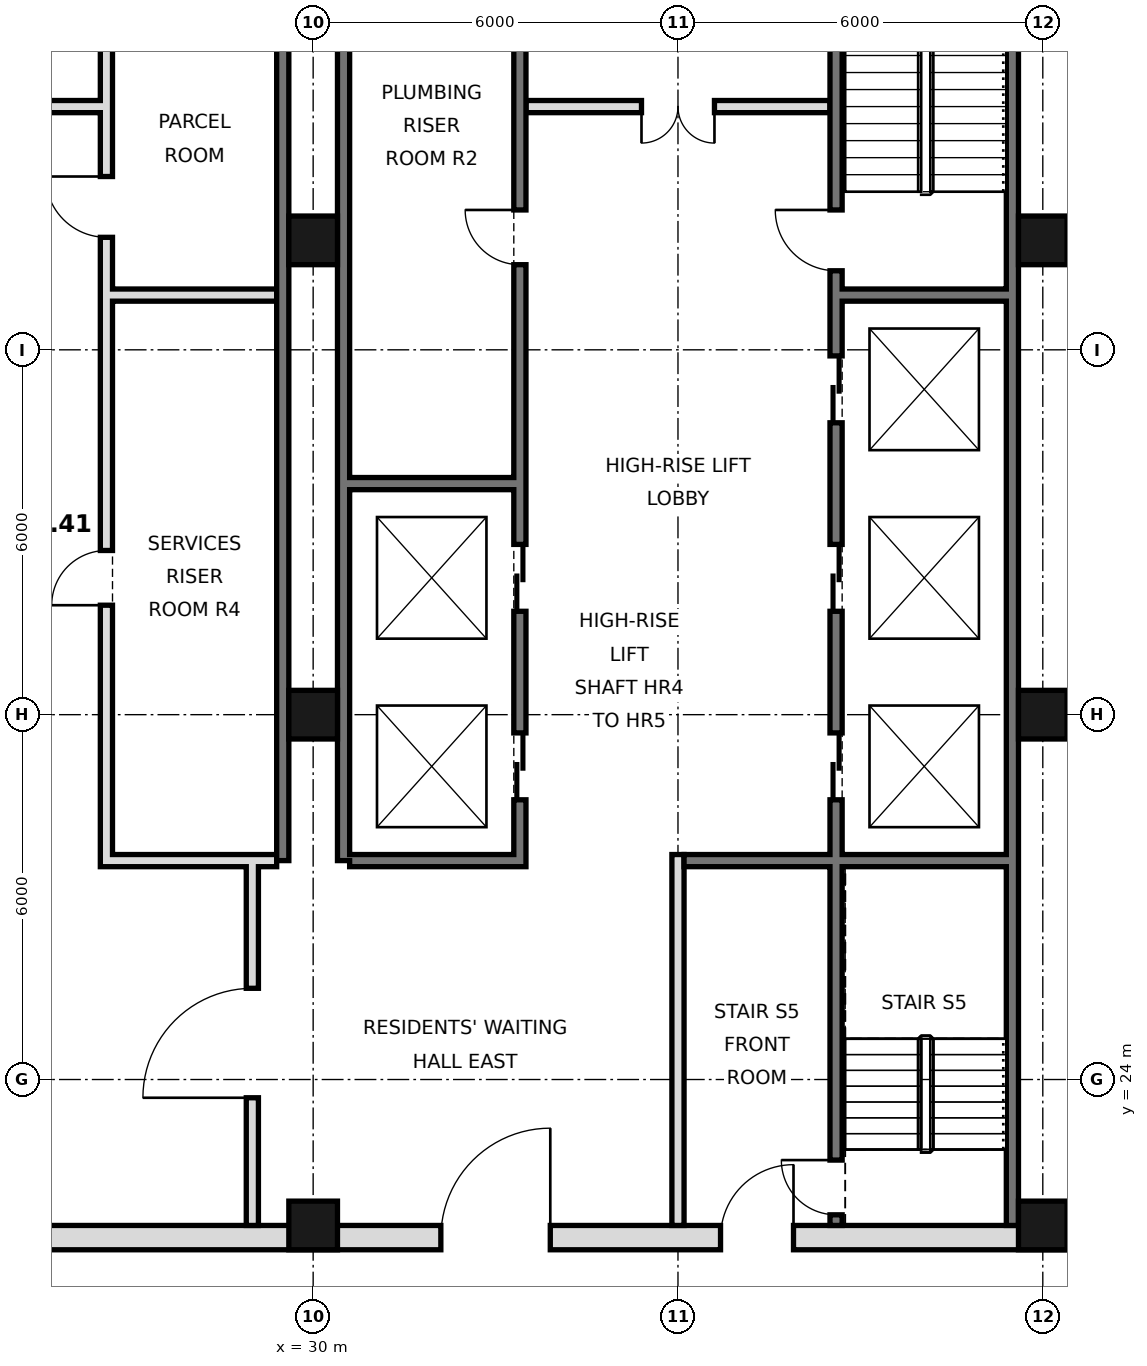
"""IFC4 building model, lengths in metres.
Left out: names, types, materials, properties, quantities, classifications, styles, units other than length and angle.
Written with IfcOpenShell. Run it as: python <this file> out.ifc"""

import sys

from ifc_helpers import new_model, si_unit, direction, frame, frame_2d, origin, origin_2d, place, context, subcontext, project, spatial, rectangle, hollow_rectangle, extrude, element, fill, save


model = new_model("IFC4")
c1 = context("Model", 3, precision=1e-05, world=origin(), true_north=direction((0.0, 1.0)))
c2 = subcontext(c1, "Body", "Model", "MODEL_VIEW")
j1 = project(units=[si_unit("LENGTHUNIT", "METRE"), si_unit("PLANEANGLEUNIT", "RADIAN")], contexts=[c1])
p1 = place(None, origin())
s1 = spatial("IfcSite", under=j1, at=p1, CompositionType="ELEMENT")
p2 = place(p1, origin())
s2 = spatial("IfcBuilding", under=s1, at=p2, CompositionType="ELEMENT")
p3 = place(p2, frame((0.0, 0.0, 161.8)))
s3 = spatial("IfcBuildingStorey", under=s2, at=p3, CompositionType="ELEMENT", Elevation=161.8)
for number, where, z_axis, x_axis in (
    (1, (30.0, 21.6, 0.0), (0.0, 0.0, 1.0), (1.0, 0.0, 0.0)),
    (2, (30.0, 30.0, 0.0), (0.0, 0.0, 1.0), (1.0, 0.0, 0.0)),
    (3, (30.0, 37.8, 0.0), (0.0, 0.0, 1.0), (1.0, 0.0, 0.0)),
    (4, (42.0, 21.6, 0.0), (0.0, 0.0, 1.0), (1.0, 0.0, 0.0)),
    (5, (42.0, 30.0, 0.0), (0.0, 0.0, 1.0), (1.0, 0.0, 0.0)),
    (6, (42.0, 37.8, 0.0), (0.0, 0.0, 1.0), (1.0, 0.0, 0.0)),
):
    element("IfcColumn", number, at=place(p3, frame(where, z_axis=z_axis, x_axis=x_axis)), inside=s3, PredefinedType="COLUMN", context=c2, shape_type="SweptSolid", body=[
        extrude(hollow_rectangle(XDim=0.8, YDim=0.8, WallThickness=0.045, at=origin_2d()), origin(), (0.0, 0.0, 1.0), 5.4),
    ])
p4 = place(p3, frame((41.5, 21.6, 0.0), z_axis=(0.0, 0.0, 1.0), x_axis=(0.0, 1.0, 0.0)))
e7 = element("IfcWall", 7, at=p4, inside=s3, PredefinedType="SOLIDWALL", context=c2, shape_type="SweptSolid", body=[
    extrude(rectangle(XDim=23.5, YDim=0.2, at=frame_2d((11.75, 0.0))), origin(), (0.0, 0.0, 1.0), 5.22),
])
for number, where, z_axis, x_axis in (
    (8, (29.5, 27.6, 0.0), (0.0, 0.0, 1.0), (0.0, 1.0, 0.0)),
    (9, (30.5, 27.6, 0.0), (0.0, 0.0, 1.0), (0.0, 1.0, 0.0)),
):
    element("IfcWall", number, at=place(p3, frame(where, z_axis=z_axis, x_axis=x_axis)), inside=s3, PredefinedType="SOLIDWALL", context=c2, shape_type="SweptSolid", body=[
        extrude(rectangle(XDim=17.5, YDim=0.2, at=frame_2d((8.75, 0.0))), origin(), (0.0, 0.0, 1.0), 5.22),
    ])
p5 = place(p3, frame((5.6, 21.4, 0.0), z_axis=(0.0, 0.0, 1.0), x_axis=(1.0, 0.0, 0.0)))
e10 = element("IfcWall", 10, at=p5, inside=s3, PredefinedType="SOLIDWALL", context=c2, shape_type="SweptSolid", body=[
    extrude(rectangle(XDim=36.8, YDim=0.4, at=frame_2d((18.4, 0.0))), origin(), (0.0, 0.0, 1.0), 5.22),
])
p6 = place(p5, frame((8.5, 0.0, 0.0)))
e11 = element("IfcOpeningElement", 11, at=p6, cuts=e10, PredefinedType="OPENING", context=c2, shape_type="SweptSolid", body=[
    extrude(rectangle(XDim=1.8, YDim=2.1, at=frame_2d((0.9, 1.05))), frame((0.0, 0.21, 0.0), z_axis=(0.0, -1.0, 0.0), x_axis=(1.0, 0.0, 0.0)), (0.0, 0.0, 1.0), 0.42),
])
p7 = place(p5, frame((17.5, 0.0, 0.0)))
e12 = element("IfcOpeningElement", 12, at=p7, cuts=e10, PredefinedType="OPENING", context=c2, shape_type="SweptSolid", body=[
    extrude(rectangle(XDim=1.8, YDim=2.1, at=frame_2d((0.9, 1.05))), frame((0.0, 0.21, 0.0), z_axis=(0.0, -1.0, 0.0), x_axis=(1.0, 0.0, 0.0)), (0.0, 0.0, 1.0), 0.42),
])
p8 = place(p5, frame((26.5, 0.0, 0.0)))
e13 = element("IfcOpeningElement", 13, at=p8, cuts=e10, PredefinedType="OPENING", context=c2, shape_type="SweptSolid", body=[
    extrude(rectangle(XDim=1.8, YDim=2.1, at=frame_2d((0.9, 1.05))), frame((0.0, 0.21, 0.0), z_axis=(0.0, -1.0, 0.0), x_axis=(1.0, 0.0, 0.0)), (0.0, 0.0, 1.0), 0.42),
])
p9 = place(p5, frame((4.5, 0.0, 0.0)))
e14 = element("IfcOpeningElement", 14, at=p9, cuts=e10, PredefinedType="OPENING", context=c2, shape_type="SweptSolid", body=[
    extrude(rectangle(XDim=1.2, YDim=2.1, at=frame_2d((0.6, 1.05))), frame((0.0, 0.21, 0.0), z_axis=(0.0, -1.0, 0.0), x_axis=(1.0, 0.0, 0.0)), (0.0, 0.0, 1.0), 0.42),
])
p10 = place(p5, frame((31.1, 0.0, 0.0)))
e15 = element("IfcOpeningElement", 15, at=p10, cuts=e10, PredefinedType="OPENING", context=c2, shape_type="SweptSolid", body=[
    extrude(rectangle(XDim=1.2, YDim=2.1, at=frame_2d((0.6, 1.05))), frame((0.0, 0.21, 0.0), z_axis=(0.0, -1.0, 0.0), x_axis=(1.0, 0.0, 0.0)), (0.0, 0.0, 1.0), 0.42),
])
p11 = place(p3, frame((29.0, 21.6, 0.0), z_axis=(0.0, 0.0, 1.0), x_axis=(0.0, 1.0, 0.0)))
e16 = element("IfcWall", 16, at=p11, inside=s3, PredefinedType="PARTITIONING", context=c2, shape_type="SweptSolid", body=[
    extrude(rectangle(XDim=6.0, YDim=0.2, at=frame_2d((3.0, 0.0))), origin(), (0.0, 0.0, 1.0), 5.22),
])
p12 = place(p11, frame((2.1, 0.0, 0.0)))
e17 = element("IfcOpeningElement", 17, at=p12, cuts=e16, PredefinedType="OPENING", context=c2, shape_type="SweptSolid", body=[
    extrude(rectangle(XDim=1.8, YDim=2.1, at=frame_2d((0.9, 1.05))), frame((0.0, 0.11, 0.0), z_axis=(0.0, -1.0, 0.0), x_axis=(1.0, 0.0, 0.0)), (0.0, 0.0, 1.0), 0.22),
])
p13 = place(p3, frame((26.6, 27.5, 0.0), z_axis=(0.0, 0.0, 1.0), x_axis=(0.0, 1.0, 0.0)))
e18 = element("IfcWall", 18, at=p13, inside=s3, PredefinedType="SOLIDWALL", context=c2, shape_type="SweptSolid", body=[
    extrude(rectangle(XDim=17.5, YDim=0.2, at=frame_2d((8.75, 0.0))), origin(), (0.0, 0.0, 1.0), 5.22),
])
p14 = place(p13, frame((4.3, 0.0, 0.0)))
e19 = element("IfcOpeningElement", 19, at=p14, cuts=e18, PredefinedType="OPENING", context=c2, shape_type="SweptSolid", body=[
    extrude(rectangle(XDim=0.9, YDim=2.1, at=frame_2d((0.45, 1.05))), frame((0.0, 0.11, 0.0), z_axis=(0.0, -1.0, 0.0), x_axis=(1.0, 0.0, 0.0)), (0.0, 0.0, 1.0), 0.22),
])
p15 = place(p13, frame((10.35, 0.0, 0.0)))
e20 = element("IfcOpeningElement", 20, at=p15, cuts=e18, PredefinedType="OPENING", context=c2, shape_type="SweptSolid", body=[
    extrude(rectangle(XDim=1.0, YDim=2.1, at=frame_2d((0.5, 1.05))), frame((0.0, 0.11, 0.0), z_axis=(0.0, -1.0, 0.0), x_axis=(1.0, 0.0, 0.0)), (0.0, 0.0, 1.0), 0.22),
])
p16 = place(p13, frame((15.475, 0.0, 0.0)))
e21 = element("IfcOpeningElement", 21, at=p16, cuts=e18, PredefinedType="OPENING", context=c2, shape_type="SweptSolid", body=[
    extrude(rectangle(XDim=1.0, YDim=2.1, at=frame_2d((0.5, 1.05))), frame((0.0, 0.11, 0.0), z_axis=(0.0, -1.0, 0.0), x_axis=(1.0, 0.0, 0.0)), (0.0, 0.0, 1.0), 0.22),
])
p17 = place(p3, frame((33.4, 27.5, 0.0), z_axis=(0.0, 0.0, 1.0), x_axis=(0.0, 1.0, 0.0)))
e22 = element("IfcWall", 22, at=p17, inside=s3, PredefinedType="SOLIDWALL", context=c2, shape_type="SweptSolid", body=[
    extrude(rectangle(XDim=17.5, YDim=0.2, at=frame_2d((8.75, 0.0))), origin(), (0.0, 0.0, 1.0), 5.22),
])
p18 = place(p17, frame((1.1, 0.0, 0.0)))
e23 = element("IfcOpeningElement", 23, at=p18, cuts=e22, PredefinedType="OPENING", context=c2, shape_type="SweptSolid", body=[
    extrude(rectangle(XDim=1.1, YDim=2.1, at=frame_2d((0.55, 1.05))), frame((0.0, 0.11, 0.0), z_axis=(0.0, -1.0, 0.0), x_axis=(1.0, 0.0, 0.0)), (0.0, 0.0, 1.0), 0.22),
])
p19 = place(p17, frame((4.2, 0.0, 0.0)))
e24 = element("IfcOpeningElement", 24, at=p19, cuts=e22, PredefinedType="OPENING", context=c2, shape_type="SweptSolid", body=[
    extrude(rectangle(XDim=1.1, YDim=2.1, at=frame_2d((0.55, 1.05))), frame((0.0, 0.11, 0.0), z_axis=(0.0, -1.0, 0.0), x_axis=(1.0, 0.0, 0.0)), (0.0, 0.0, 1.0), 0.22),
])
p20 = place(p17, frame((15.4, 0.0, 0.0)))
e25 = element("IfcOpeningElement", 25, at=p20, cuts=e22, PredefinedType="OPENING", context=c2, shape_type="SweptSolid", body=[
    extrude(rectangle(XDim=1.1, YDim=2.1, at=frame_2d((0.55, 1.05))), frame((0.0, 0.11, 0.0), z_axis=(0.0, -1.0, 0.0), x_axis=(1.0, 0.0, 0.0)), (0.0, 0.0, 1.0), 0.22),
])
p21 = place(p17, frame((9.9, 0.0, 0.0)))
e26 = element("IfcOpeningElement", 26, at=p21, cuts=e22, PredefinedType="OPENING", context=c2, shape_type="SweptSolid", body=[
    extrude(rectangle(XDim=0.9, YDim=2.1, at=frame_2d((0.45, 1.05))), frame((0.0, 0.11, 0.0), z_axis=(0.0, -1.0, 0.0), x_axis=(1.0, 0.0, 0.0)), (0.0, 0.0, 1.0), 0.22),
])
p22 = place(p3, frame((36.0, 21.6, 0.0), z_axis=(0.0, 0.0, 1.0), x_axis=(0.0, 1.0, 0.0)))
e27 = element("IfcWall", 27, at=p22, inside=s3, PredefinedType="PARTITIONING", context=c2, shape_type="SweptSolid", body=[
    extrude(rectangle(XDim=6.1, YDim=0.2, at=frame_2d((3.05, 0.0))), origin(), (0.0, 0.0, 1.0), 5.22),
])
p23 = place(p3, frame((38.6, 21.6, 0.0), z_axis=(0.0, 0.0, 1.0), x_axis=(0.0, 1.0, 0.0)))
e28 = element("IfcWall", 28, at=p23, inside=s3, PredefinedType="SOLIDWALL", context=c2, shape_type="SweptSolid", body=[
    extrude(rectangle(XDim=23.4, YDim=0.2, at=frame_2d((11.7, 0.0))), origin(), (0.0, 0.0, 1.0), 5.22),
])
p24 = place(p23, frame((7.0, 0.0, 0.0)))
e29 = element("IfcOpeningElement", 29, at=p24, cuts=e28, PredefinedType="OPENING", context=c2, shape_type="SweptSolid", body=[
    extrude(rectangle(XDim=1.1, YDim=2.1, at=frame_2d((0.55, 1.05))), frame((0.0, 0.11, 0.0), z_axis=(0.0, -1.0, 0.0), x_axis=(1.0, 0.0, 0.0)), (0.0, 0.0, 1.0), 0.22),
])
p25 = place(p23, frame((10.1, 0.0, 0.0)))
e30 = element("IfcOpeningElement", 30, at=p25, cuts=e28, PredefinedType="OPENING", context=c2, shape_type="SweptSolid", body=[
    extrude(rectangle(XDim=1.1, YDim=2.1, at=frame_2d((0.55, 1.05))), frame((0.0, 0.11, 0.0), z_axis=(0.0, -1.0, 0.0), x_axis=(1.0, 0.0, 0.0)), (0.0, 0.0, 1.0), 0.22),
])
p26 = place(p23, frame((13.2, 0.0, 0.0)))
e31 = element("IfcOpeningElement", 31, at=p26, cuts=e28, PredefinedType="OPENING", context=c2, shape_type="SweptSolid", body=[
    extrude(rectangle(XDim=1.1, YDim=2.1, at=frame_2d((0.55, 1.05))), frame((0.0, 0.11, 0.0), z_axis=(0.0, -1.0, 0.0), x_axis=(1.0, 0.0, 0.0)), (0.0, 0.0, 1.0), 0.22),
])
p27 = place(p23, frame((15.7, 0.0, 0.0)))
e32 = element("IfcOpeningElement", 32, at=p27, cuts=e28, PredefinedType="OPENING", context=c2, shape_type="SweptSolid", body=[
    extrude(rectangle(XDim=1.0, YDim=2.1, at=frame_2d((0.5, 1.05))), frame((0.0, 0.11, 0.0), z_axis=(0.0, -1.0, 0.0), x_axis=(1.0, 0.0, 0.0)), (0.0, 0.0, 1.0), 0.22),
])
p28 = place(p23, frame((0.175, 0.0, 0.0)))
e33 = element("IfcOpeningElement", 33, at=p28, cuts=e28, PredefinedType="OPENING", context=c2, shape_type="SweptSolid", body=[
    extrude(rectangle(XDim=0.9, YDim=2.1, at=frame_2d((0.45, 1.05))), frame((0.0, 0.11, 0.0), z_axis=(0.0, -1.0, 0.0), x_axis=(1.0, 0.0, 0.0)), (0.0, 0.0, 1.0), 0.22),
])
for number, where, z_axis, x_axis in (
    (34, (26.7, 27.6, 0.0), (0.0, 0.0, 1.0), (1.0, 0.0, 0.0)),
    (35, (30.6, 27.6, 0.0), (0.0, 0.0, 1.0), (1.0, 0.0, 0.0)),
):
    element("IfcWall", number, at=place(p3, frame(where, z_axis=z_axis, x_axis=x_axis)), inside=s3, PredefinedType="SOLIDWALL", context=c2, shape_type="SweptSolid", body=[
        extrude(rectangle(XDim=2.7, YDim=0.2, at=frame_2d((1.35, 0.0))), origin(), (0.0, 0.0, 1.0), 5.22),
    ])
p29 = place(p3, frame((36.1, 27.6, 0.0), z_axis=(0.0, 0.0, 1.0), x_axis=(1.0, 0.0, 0.0)))
e36 = element("IfcWall", 36, at=p29, inside=s3, PredefinedType="SOLIDWALL", context=c2, shape_type="SweptSolid", body=[
    extrude(rectangle(XDim=5.3, YDim=0.2, at=frame_2d((2.65, 0.0))), origin(), (0.0, 0.0, 1.0), 5.22),
])
for number, where, z_axis, x_axis in (
    (37, (30.6, 33.8, 0.0), (0.0, 0.0, 1.0), (1.0, 0.0, 0.0)),
    (38, (26.7, 36.9, 0.0), (0.0, 0.0, 1.0), (1.0, 0.0, 0.0)),
    (39, (38.7, 36.9, 0.0), (0.0, 0.0, 1.0), (1.0, 0.0, 0.0)),
):
    element("IfcWall", number, at=place(p3, frame(where, z_axis=z_axis, x_axis=x_axis)), inside=s3, PredefinedType="SOLIDWALL", context=c2, shape_type="SweptSolid", body=[
        extrude(rectangle(XDim=2.7, YDim=0.2, at=frame_2d((1.35, 0.0))), origin(), (0.0, 0.0, 1.0), 5.22),
    ])
p30 = place(p3, frame((21.5, 40.0, 0.0), z_axis=(0.0, 0.0, 1.0), x_axis=(1.0, 0.0, 0.0)))
e40 = element("IfcWall", 40, at=p30, inside=s3, PredefinedType="PARTITIONING", context=c2, shape_type="SweptSolid", body=[
    extrude(rectangle(XDim=5.0, YDim=0.2, at=frame_2d((2.5, 0.0))), origin(), (0.0, 0.0, 1.0), 5.22),
])
p31 = place(p30, frame((1.9, 0.0, 0.0)))
e41 = element("IfcOpeningElement", 41, at=p31, cuts=e40, PredefinedType="OPENING", context=c2, shape_type="SweptSolid", body=[
    extrude(rectangle(XDim=1.2, YDim=2.1, at=frame_2d((0.6, 1.05))), frame((0.0, 0.11, 0.0), z_axis=(0.0, -1.0, 0.0), x_axis=(1.0, 0.0, 0.0)), (0.0, 0.0, 1.0), 0.22),
])
p32 = place(p3, frame((33.5, 40.0, 0.0), z_axis=(0.0, 0.0, 1.0), x_axis=(1.0, 0.0, 0.0)))
e42 = element("IfcWall", 42, at=p32, inside=s3, PredefinedType="PARTITIONING", context=c2, shape_type="SweptSolid", body=[
    extrude(rectangle(XDim=5.0, YDim=0.2, at=frame_2d((2.5, 0.0))), origin(), (0.0, 0.0, 1.0), 5.22),
])
p33 = place(p32, frame((1.9, 0.0, 0.0)))
e43 = element("IfcOpeningElement", 43, at=p33, cuts=e42, PredefinedType="OPENING", context=c2, shape_type="SweptSolid", body=[
    extrude(rectangle(XDim=1.2, YDim=2.1, at=frame_2d((0.6, 1.05))), frame((0.0, 0.11, 0.0), z_axis=(0.0, -1.0, 0.0), x_axis=(1.0, 0.0, 0.0)), (0.0, 0.0, 1.0), 0.22),
])
p34 = place(p12, origin())
e44 = element("IfcDoor", 44, at=p34, inside=s3, OperationType="SINGLE_SWING_LEFT", PredefinedType="DOOR", context=c2, shape_type="SweptSolid", body=[
    extrude(rectangle(XDim=1.8, YDim=2.1, at=frame_2d((0.9, 1.05))), frame((0.0, 0.025, 0.0), z_axis=(0.0, -1.0, 0.0), x_axis=(1.0, 0.0, 0.0)), (0.0, 0.0, 1.0), 0.05),
])
fill(e17, e44)
p35 = place(p8, frame((1.8, 0.0, 0.0), z_axis=(0.0, 0.0, 1.0), x_axis=(-1.0, 0.0, 0.0)))
e45 = element("IfcDoor", 45, at=p35, inside=s3, OperationType="SINGLE_SWING_LEFT", PredefinedType="DOOR", context=c2, shape_type="SweptSolid", body=[
    extrude(rectangle(XDim=1.8, YDim=2.1, at=frame_2d((0.9, 1.05))), frame((0.0, 0.025, 0.0), z_axis=(0.0, -1.0, 0.0), x_axis=(1.0, 0.0, 0.0)), (0.0, 0.0, 1.0), 0.05),
])
fill(e13, e45)
p36 = place(p10, frame((1.2, 0.0, 0.0), z_axis=(0.0, 0.0, 1.0), x_axis=(-1.0, 0.0, 0.0)))
e46 = element("IfcDoor", 46, at=p36, inside=s3, OperationType="SINGLE_SWING_LEFT", PredefinedType="DOOR", context=c2, shape_type="SweptSolid", body=[
    extrude(rectangle(XDim=1.2, YDim=2.1, at=frame_2d((0.6, 1.05))), frame((0.0, 0.025, 0.0), z_axis=(0.0, -1.0, 0.0), x_axis=(1.0, 0.0, 0.0)), (0.0, 0.0, 1.0), 0.05),
])
fill(e15, e46)
p37 = place(p33, frame((1.2, 0.0, 0.0), z_axis=(0.0, 0.0, 1.0), x_axis=(-1.0, 0.0, 0.0)))
e47 = element("IfcDoor", 47, at=p37, inside=s3, OperationType="DOUBLE_DOOR_SINGLE_SWING", PredefinedType="DOOR", context=c2, shape_type="SweptSolid", body=[
    extrude(rectangle(XDim=1.2, YDim=2.1, at=frame_2d((0.6, 1.05))), frame((0.0, 0.025, 0.0), z_axis=(0.0, -1.0, 0.0), x_axis=(1.0, 0.0, 0.0)), (0.0, 0.0, 1.0), 0.05),
])
fill(e43, e47)
p38 = place(p24, origin())
e48 = element("IfcDoor", 48, at=p38, inside=s3, OperationType="DOUBLE_DOOR_SLIDING", PredefinedType="DOOR", context=c2, shape_type="SweptSolid", body=[
    extrude(rectangle(XDim=1.1, YDim=2.1, at=frame_2d((0.55, 1.05))), frame((0.0, 0.025, 0.0), z_axis=(0.0, -1.0, 0.0), x_axis=(1.0, 0.0, 0.0)), (0.0, 0.0, 1.0), 0.05),
])
fill(e29, e48)
p39 = place(p25, origin())
e49 = element("IfcDoor", 49, at=p39, inside=s3, OperationType="DOUBLE_DOOR_SLIDING", PredefinedType="DOOR", context=c2, shape_type="SweptSolid", body=[
    extrude(rectangle(XDim=1.1, YDim=2.1, at=frame_2d((0.55, 1.05))), frame((0.0, 0.025, 0.0), z_axis=(0.0, -1.0, 0.0), x_axis=(1.0, 0.0, 0.0)), (0.0, 0.0, 1.0), 0.05),
])
fill(e30, e49)
p40 = place(p26, origin())
e50 = element("IfcDoor", 50, at=p40, inside=s3, OperationType="DOUBLE_DOOR_SLIDING", PredefinedType="DOOR", context=c2, shape_type="SweptSolid", body=[
    extrude(rectangle(XDim=1.1, YDim=2.1, at=frame_2d((0.55, 1.05))), frame((0.0, 0.025, 0.0), z_axis=(0.0, -1.0, 0.0), x_axis=(1.0, 0.0, 0.0)), (0.0, 0.0, 1.0), 0.05),
])
fill(e31, e50)
p41 = place(p18, origin())
e51 = element("IfcDoor", 51, at=p41, inside=s3, OperationType="DOUBLE_DOOR_SLIDING", PredefinedType="DOOR", context=c2, shape_type="SweptSolid", body=[
    extrude(rectangle(XDim=1.1, YDim=2.1, at=frame_2d((0.55, 1.05))), frame((0.0, 0.025, 0.0), z_axis=(0.0, -1.0, 0.0), x_axis=(1.0, 0.0, 0.0)), (0.0, 0.0, 1.0), 0.05),
])
fill(e23, e51)
p42 = place(p19, origin())
e52 = element("IfcDoor", 52, at=p42, inside=s3, OperationType="DOUBLE_DOOR_SLIDING", PredefinedType="DOOR", context=c2, shape_type="SweptSolid", body=[
    extrude(rectangle(XDim=1.1, YDim=2.1, at=frame_2d((0.55, 1.05))), frame((0.0, 0.025, 0.0), z_axis=(0.0, -1.0, 0.0), x_axis=(1.0, 0.0, 0.0)), (0.0, 0.0, 1.0), 0.05),
])
fill(e24, e52)
p43 = place(p27, frame((1.0, 0.0, 0.0), z_axis=(0.0, 0.0, 1.0), x_axis=(-1.0, 0.0, 0.0)))
e53 = element("IfcDoor", 53, at=p43, inside=s3, OperationType="SINGLE_SWING_LEFT", PredefinedType="DOOR", context=c2, shape_type="SweptSolid", body=[
    extrude(rectangle(XDim=1.0, YDim=2.1, at=frame_2d((0.5, 1.05))), frame((0.0, 0.025, 0.0), z_axis=(0.0, -1.0, 0.0), x_axis=(1.0, 0.0, 0.0)), (0.0, 0.0, 1.0), 0.05),
])
fill(e32, e53)
p44 = place(p28, frame((0.9, 0.0, 0.0), z_axis=(0.0, 0.0, 1.0), x_axis=(-1.0, 0.0, 0.0)))
e54 = element("IfcDoor", 54, at=p44, inside=s3, OperationType="SINGLE_SWING_LEFT", PredefinedType="DOOR", context=c2, shape_type="SweptSolid", body=[
    extrude(rectangle(XDim=0.9, YDim=2.1, at=frame_2d((0.45, 1.05))), frame((0.0, 0.025, 0.0), z_axis=(0.0, -1.0, 0.0), x_axis=(1.0, 0.0, 0.0)), (0.0, 0.0, 1.0), 0.05),
])
fill(e33, e54)
p45 = place(p21, frame((0.9, 0.0, 0.0), z_axis=(0.0, 0.0, 1.0), x_axis=(-1.0, 0.0, 0.0)))
e55 = element("IfcDoor", 55, at=p45, inside=s3, OperationType="SINGLE_SWING_LEFT", PredefinedType="DOOR", context=c2, shape_type="SweptSolid", body=[
    extrude(rectangle(XDim=0.9, YDim=2.1, at=frame_2d((0.45, 1.05))), frame((0.0, 0.025, 0.0), z_axis=(0.0, -1.0, 0.0), x_axis=(1.0, 0.0, 0.0)), (0.0, 0.0, 1.0), 0.05),
])
fill(e26, e55)
p46 = place(p14, origin())
e56 = element("IfcDoor", 56, at=p46, inside=s3, OperationType="SINGLE_SWING_LEFT", PredefinedType="DOOR", context=c2, shape_type="SweptSolid", body=[
    extrude(rectangle(XDim=0.9, YDim=2.1, at=frame_2d((0.45, 1.05))), frame((0.0, 0.025, 0.0), z_axis=(0.0, -1.0, 0.0), x_axis=(1.0, 0.0, 0.0)), (0.0, 0.0, 1.0), 0.05),
])
fill(e19, e56)
p47 = place(p15, frame((1.0, 0.0, 0.0), z_axis=(0.0, 0.0, 1.0), x_axis=(-1.0, 0.0, 0.0)))
e57 = element("IfcDoor", 57, at=p47, inside=s3, OperationType="SINGLE_SWING_LEFT", PredefinedType="DOOR", context=c2, shape_type="SweptSolid", body=[
    extrude(rectangle(XDim=1.0, YDim=2.1, at=frame_2d((0.5, 1.05))), frame((0.0, 0.025, 0.0), z_axis=(0.0, -1.0, 0.0), x_axis=(1.0, 0.0, 0.0)), (0.0, 0.0, 1.0), 0.05),
])
fill(e20, e57)
save(model, sys.argv[1])
